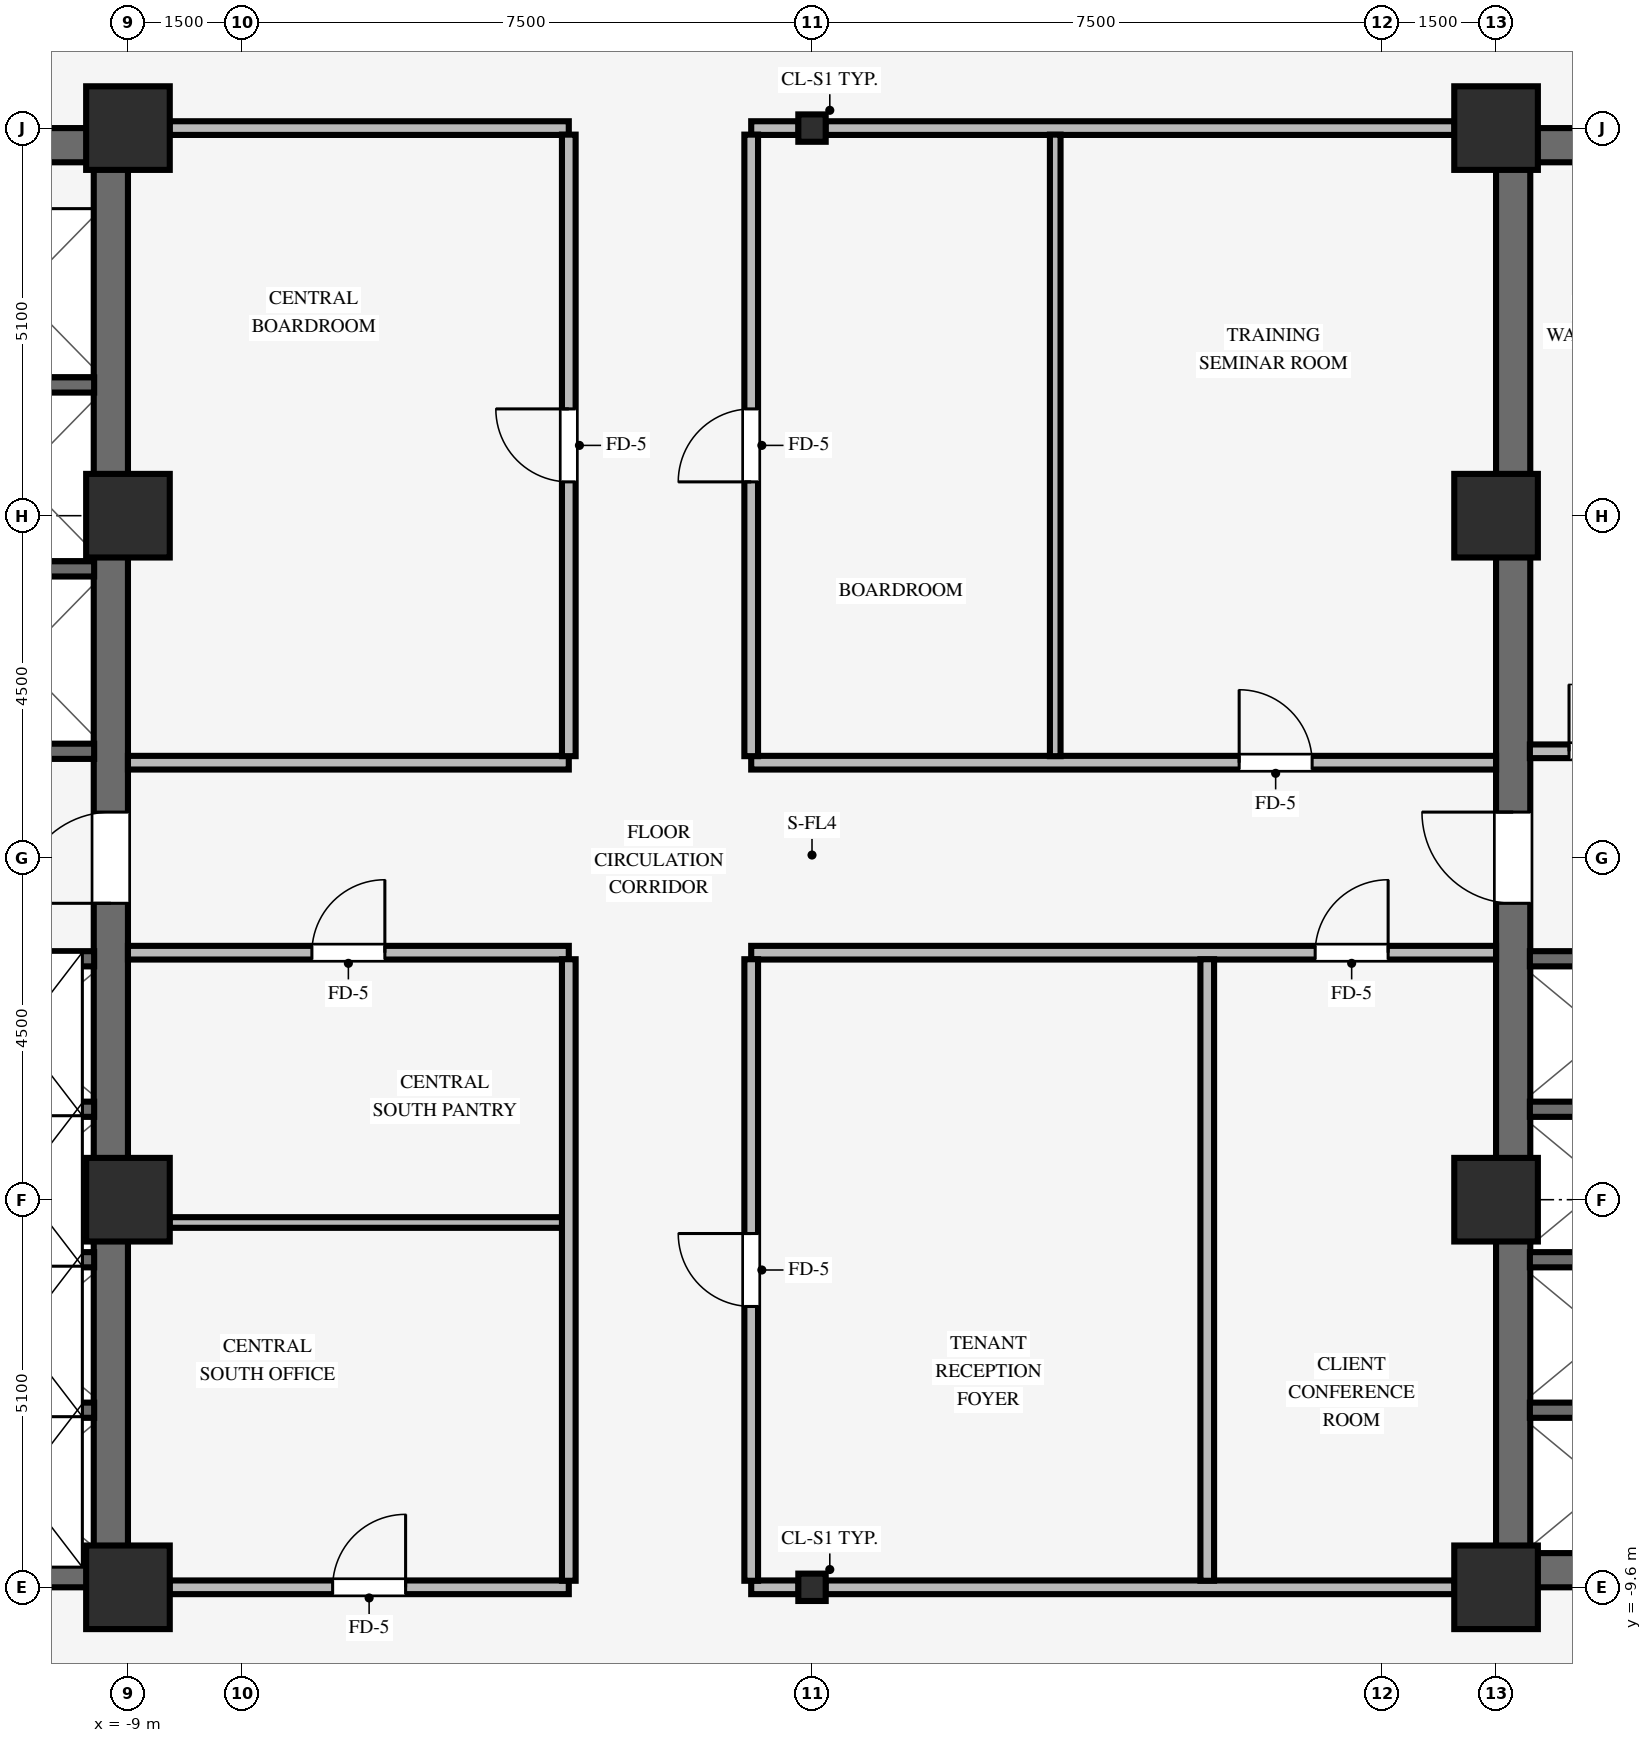
"""IFC4 building model, lengths in metres.
Left out: names, types, materials, properties, quantities, classifications, styles, units other than length and angle.
Written with IfcOpenShell. Run it as: python <this file> out.ifc"""

import sys

from ifc_helpers import new_model, si_unit, direction, frame, frame_2d, origin, origin_2d, place, context, subcontext, project, spatial, rectangle, i_section, extrude, source, transform, mapped, element, fill, save


model = new_model("IFC4")
c1 = context("Model", 3, precision=1e-05, world=origin(), true_north=direction((0.0, 1.0)))
c2 = subcontext(c1, "Body", "Model", "MODEL_VIEW")
j1 = project(units=[si_unit("LENGTHUNIT", "METRE"), si_unit("PLANEANGLEUNIT", "RADIAN")], contexts=[c1])
p1 = place(None, origin())
s1 = spatial("IfcSite", under=j1, at=p1, CompositionType="ELEMENT")
p2 = place(p1, origin())
s2 = spatial("IfcBuilding", under=s1, at=p2, CompositionType="ELEMENT")
p3 = place(p2, frame((0.0, 0.0, 78.7)))
s3 = spatial("IfcBuildingStorey", under=s2, at=p3, CompositionType="ELEMENT", Elevation=78.7)
for number, where, z_axis, x_axis in (
    (1, (-17.5, -9.375, 0.0), (0.0, 0.0, 1.0), (1.0, 0.0, 0.0)),
    (2, (-17.5, 9.375, 0.0), (0.0, 0.0, 1.0), (1.0, 0.0, 0.0)),
):
    element("IfcWall", number, at=place(p3, frame(where, z_axis=z_axis, x_axis=x_axis)), inside=s3, PredefinedType="SHEAR", context=c2, shape_type="SweptSolid", body=[
        extrude(rectangle(XDim=8.5, YDim=0.45, at=frame_2d((4.25, 0.0))), origin(), (0.0, 0.0, 1.0), 3.37),
    ])
p4 = place(p3, frame((-9.225, -9.155, 0.0), z_axis=(0.0, 0.0, 1.0), x_axis=(0.0, 1.0, 0.0)))
e3 = element("IfcWall", 3, at=p4, inside=s3, PredefinedType="SHEAR", context=c2, shape_type="SweptSolid", body=[
    extrude(rectangle(XDim=18.31, YDim=0.45, at=frame_2d((9.155, 0.0))), origin(), (0.0, 0.0, 1.0), 3.37),
])
p5 = place(p4, frame((8.555, 0.0, 0.0)))
e4 = element("IfcOpeningElement", 4, at=p5, cuts=e3, PredefinedType="OPENING", context=c2, shape_type="SweptSolid", body=[
    extrude(rectangle(XDim=1.2, YDim=2.15, at=frame_2d((0.6, 1.075))), frame((0.0, 0.235, 0.0), z_axis=(0.0, -1.0, 0.0), x_axis=(1.0, 0.0, 0.0)), (0.0, 0.0, 1.0), 0.47),
])
for number, where, z_axis, x_axis in (
    (5, (9.0, -9.375, 0.0), (0.0, 0.0, 1.0), (1.0, 0.0, 0.0)),
    (6, (9.0, 9.375, 0.0), (0.0, 0.0, 1.0), (1.0, 0.0, 0.0)),
):
    element("IfcWall", number, at=place(p3, frame(where, z_axis=z_axis, x_axis=x_axis)), inside=s3, PredefinedType="SHEAR", context=c2, shape_type="SweptSolid", body=[
        extrude(rectangle(XDim=8.5, YDim=0.45, at=frame_2d((4.25, 0.0))), origin(), (0.0, 0.0, 1.0), 3.37),
    ])
p6 = place(p3, frame((9.225, -9.155, 0.0), z_axis=(0.0, 0.0, 1.0), x_axis=(0.0, 1.0, 0.0)))
e7 = element("IfcWall", 7, at=p6, inside=s3, PredefinedType="SHEAR", context=c2, shape_type="SweptSolid", body=[
    extrude(rectangle(XDim=18.31, YDim=0.45, at=frame_2d((9.155, 0.0))), origin(), (0.0, 0.0, 1.0), 3.37),
])
p7 = place(p6, frame((8.555, 0.0, 0.0)))
e8 = element("IfcOpeningElement", 8, at=p7, cuts=e7, PredefinedType="OPENING", context=c2, shape_type="SweptSolid", body=[
    extrude(rectangle(XDim=1.2, YDim=2.15, at=frame_2d((0.6, 1.075))), frame((0.0, 0.235, 0.0), z_axis=(0.0, -1.0, 0.0), x_axis=(1.0, 0.0, 0.0)), (0.0, 0.0, 1.0), 0.47),
])
for number, where, z_axis, x_axis in (
    (9, (-9.0, -9.6, 0.0), (0.0, 0.0, 1.0), (1.0, 0.0, 0.0)),
    (10, (-9.0, -4.5, 0.0), (0.0, 0.0, 1.0), (1.0, 0.0, 0.0)),
    (11, (-9.0, 4.5, 0.0), (0.0, 0.0, 1.0), (1.0, 0.0, 0.0)),
    (12, (-9.0, 9.6, 0.0), (0.0, 0.0, 1.0), (1.0, 0.0, 0.0)),
    (13, (9.0, -9.6, 0.0), (0.0, 0.0, 1.0), (1.0, 0.0, 0.0)),
    (14, (9.0, -4.5, 0.0), (0.0, 0.0, 1.0), (1.0, 0.0, 0.0)),
    (15, (9.0, 4.5, 0.0), (0.0, 0.0, 1.0), (1.0, 0.0, 0.0)),
    (16, (9.0, 9.6, 0.0), (0.0, 0.0, 1.0), (1.0, 0.0, 0.0)),
):
    element("IfcColumn", number, at=place(p3, frame(where, z_axis=z_axis, x_axis=x_axis)), inside=s3, PredefinedType="COLUMN", context=c2, shape_type="SweptSolid", body=[
        extrude(rectangle(XDim=1.1, YDim=1.1, at=origin_2d()), origin(), (0.0, 0.0, 1.0), 3.37),
    ])
for number, where, z_axis, x_axis in (
    (17, (0.0, -9.6, 0.0), (0.0, 0.0, 1.0), (1.0, 0.0, 0.0)),
    (18, (0.0, 9.6, 0.0), (0.0, 0.0, 1.0), (1.0, 0.0, 0.0)),
):
    element("IfcColumn", number, at=place(p3, frame(where, z_axis=z_axis, x_axis=x_axis)), inside=s3, PredefinedType="COLUMN", context=c2, shape_type="SweptSolid", body=[
        extrude(i_section(OverallWidth=0.36, OverallDepth=0.36, WebThickness=0.021, FlangeThickness=0.021, FilletRadius=0.018, at=origin_2d()), origin(), (0.0, 0.0, 1.0), 3.37),
    ])
for number, where, z_axis, x_axis in (
    (19, (-11.505, -7.27, 0.0), (0.0, 0.0, 1.0), (1.0, 0.0, 0.0)),
    (20, (-11.505, -5.29, 0.0), (0.0, 0.0, 1.0), (1.0, 0.0, 0.0)),
    (21, (-11.505, -3.31, 0.0), (0.0, 0.0, 1.0), (1.0, 0.0, 0.0)),
    (22, (-11.505, -1.33, 0.0), (0.0, 0.0, 1.0), (1.0, 0.0, 0.0)),
    (23, (-11.505, 1.4, 0.0), (0.0, 0.0, 1.0), (1.0, 0.0, 0.0)),
    (24, (-11.505, 3.8, 0.0), (0.0, 0.0, 1.0), (1.0, 0.0, 0.0)),
    (25, (-11.505, 6.22, 0.0), (0.0, 0.0, 1.0), (1.0, 0.0, 0.0)),
    (26, (9.445, -7.27, 0.0), (0.0, 0.0, 1.0), (1.0, 0.0, 0.0)),
    (27, (9.445, -5.29, 0.0), (0.0, 0.0, 1.0), (1.0, 0.0, 0.0)),
    (28, (9.445, -3.31, 0.0), (0.0, 0.0, 1.0), (1.0, 0.0, 0.0)),
    (29, (9.445, -1.33, 0.0), (0.0, 0.0, 1.0), (1.0, 0.0, 0.0)),
):
    element("IfcWall", number, at=place(p3, frame(where, z_axis=z_axis, x_axis=x_axis)), inside=s3, PredefinedType="SHEAR", context=c2, shape_type="SweptSolid", body=[
        extrude(rectangle(XDim=2.06, YDim=0.2, at=frame_2d((1.03, 0.0))), origin(), (0.0, 0.0, 1.0), 3.37),
    ])
p8 = place(p3, frame((9.445, 1.4, 0.0), z_axis=(0.0, 0.0, 1.0), x_axis=(1.0, 0.0, 0.0)))
e30 = element("IfcWall", 30, at=p8, inside=s3, PredefinedType="PARTITIONING", context=c2, shape_type="SweptSolid", body=[
    extrude(rectangle(XDim=3.9, YDim=0.18, at=frame_2d((1.95, 0.0))), origin(), (0.0, 0.0, 1.0), 3.36),
])
p9 = place(p8, frame((0.515, 0.0, 0.0)))
e31 = element("IfcOpeningElement", 31, at=p9, cuts=e30, PredefinedType="OPENING", context=c2, shape_type="SweptSolid", body=[
    extrude(rectangle(XDim=0.88, YDim=2.1, at=frame_2d((0.44, 1.05))), frame((0.0, 0.1, 0.0), z_axis=(0.0, -1.0, 0.0), x_axis=(1.0, 0.0, 0.0)), (0.0, 0.0, 1.0), 0.2),
])
p10 = place(p8, frame((2.565, 0.0, 0.0)))
e32 = element("IfcOpeningElement", 32, at=p10, cuts=e30, PredefinedType="OPENING", context=c2, shape_type="SweptSolid", body=[
    extrude(rectangle(XDim=0.88, YDim=2.1, at=frame_2d((0.44, 1.05))), frame((0.0, 0.1, 0.0), z_axis=(0.0, -1.0, 0.0), x_axis=(1.0, 0.0, 0.0)), (0.0, 0.0, 1.0), 0.2),
])
p11 = place(p3, frame((-8.454, -9.6, 0.0), z_axis=(0.0, 0.0, 1.0), x_axis=(1.0, 0.0, 0.0)))
e33 = element("IfcWall", 33, at=p11, inside=s3, PredefinedType="PARTITIONING", context=c2, shape_type="SweptSolid", body=[
    extrude(rectangle(XDim=5.254, YDim=0.18, at=frame_2d((2.627, 0.0))), origin(), (0.0, 0.0, 1.0), 2.405),
])
p12 = place(p11, frame((2.147, 0.0, 0.0)))
e34 = element("IfcOpeningElement", 34, at=p12, cuts=e33, PredefinedType="OPENING", context=c2, shape_type="SweptSolid", body=[
    extrude(rectangle(XDim=0.96, YDim=2.1, at=frame_2d((0.48, 1.05))), frame((0.0, 0.1, 0.0), z_axis=(0.0, -1.0, 0.0), x_axis=(1.0, 0.0, 0.0)), (0.0, 0.0, 1.0), 0.2),
])
p13 = place(p3, frame((-0.8, -9.6, 0.0), z_axis=(0.0, 0.0, 1.0), x_axis=(1.0, 0.0, 0.0)))
e35 = element("IfcWall", 35, at=p13, inside=s3, PredefinedType="PARTITIONING", context=c2, shape_type="SweptSolid", body=[
    extrude(rectangle(XDim=0.624, YDim=0.18, at=frame_2d((0.312, 0.0))), origin(), (0.0, 0.0, 1.0), 2.405),
])
p14 = place(p3, frame((0.176, -9.6, 0.0), z_axis=(0.0, 0.0, 1.0), x_axis=(1.0, 0.0, 0.0)))
e36 = element("IfcWall", 36, at=p14, inside=s3, PredefinedType="PARTITIONING", context=c2, shape_type="SweptSolid", body=[
    extrude(rectangle(XDim=8.278, YDim=0.18, at=frame_2d((4.139, 0.0))), origin(), (0.0, 0.0, 1.0), 2.405),
])
p15 = place(p3, frame((-8.454, -4.8, 0.0), z_axis=(0.0, 0.0, 1.0), x_axis=(1.0, 0.0, 0.0)))
e37 = element("IfcWall", 37, at=p15, inside=s3, PredefinedType="PARTITIONING", context=c2, shape_type="SweptSolid", body=[
    extrude(rectangle(XDim=5.168, YDim=0.14, at=frame_2d((2.584, 0.0))), origin(), (0.0, 0.0, 1.0), 2.738),
])
p16 = place(p3, frame((-9.0, -1.25, 0.0), z_axis=(0.0, 0.0, 1.0), x_axis=(1.0, 0.0, 0.0)))
e38 = element("IfcWall", 38, at=p16, inside=s3, PredefinedType="PARTITIONING", context=c2, shape_type="SweptSolid", body=[
    extrude(rectangle(XDim=5.8, YDim=0.18, at=frame_2d((2.9, 0.0))), origin(), (0.0, 0.0, 1.0), 3.36),
])
p17 = place(p16, frame((2.42, 0.0, 0.0)))
e39 = element("IfcOpeningElement", 39, at=p17, cuts=e38, PredefinedType="OPENING", context=c2, shape_type="SweptSolid", body=[
    extrude(rectangle(XDim=0.96, YDim=2.1, at=frame_2d((0.48, 1.05))), frame((0.0, 0.1, 0.0), z_axis=(0.0, -1.0, 0.0), x_axis=(1.0, 0.0, 0.0)), (0.0, 0.0, 1.0), 0.2),
])
p18 = place(p3, frame((-0.8, -1.25, 0.0), z_axis=(0.0, 0.0, 1.0), x_axis=(1.0, 0.0, 0.0)))
e40 = element("IfcWall", 40, at=p18, inside=s3, PredefinedType="PARTITIONING", context=c2, shape_type="SweptSolid", body=[
    extrude(rectangle(XDim=9.8, YDim=0.18, at=frame_2d((4.9, 0.0))), origin(), (0.0, 0.0, 1.0), 3.36),
])
p19 = place(p18, frame((7.42, 0.0, 0.0)))
e41 = element("IfcOpeningElement", 41, at=p19, cuts=e40, PredefinedType="OPENING", context=c2, shape_type="SweptSolid", body=[
    extrude(rectangle(XDim=0.96, YDim=2.1, at=frame_2d((0.48, 1.05))), frame((0.0, 0.1, 0.0), z_axis=(0.0, -1.0, 0.0), x_axis=(1.0, 0.0, 0.0)), (0.0, 0.0, 1.0), 0.2),
])
p20 = place(p3, frame((-9.0, 1.25, 0.0), z_axis=(0.0, 0.0, 1.0), x_axis=(1.0, 0.0, 0.0)))
e42 = element("IfcWall", 42, at=p20, inside=s3, PredefinedType="PARTITIONING", context=c2, shape_type="SweptSolid", body=[
    extrude(rectangle(XDim=5.8, YDim=0.18, at=frame_2d((2.9, 0.0))), origin(), (0.0, 0.0, 1.0), 3.36),
])
p21 = place(p3, frame((-0.8, 1.25, 0.0), z_axis=(0.0, 0.0, 1.0), x_axis=(1.0, 0.0, 0.0)))
e43 = element("IfcWall", 43, at=p21, inside=s3, PredefinedType="PARTITIONING", context=c2, shape_type="SweptSolid", body=[
    extrude(rectangle(XDim=9.8, YDim=0.18, at=frame_2d((4.9, 0.0))), origin(), (0.0, 0.0, 1.0), 3.36),
])
p22 = place(p21, frame((6.42, 0.0, 0.0)))
e44 = element("IfcOpeningElement", 44, at=p22, cuts=e43, PredefinedType="OPENING", context=c2, shape_type="SweptSolid", body=[
    extrude(rectangle(XDim=0.96, YDim=2.1, at=frame_2d((0.48, 1.05))), frame((0.0, 0.1, 0.0), z_axis=(0.0, -1.0, 0.0), x_axis=(1.0, 0.0, 0.0)), (0.0, 0.0, 1.0), 0.2),
])
p23 = place(p3, frame((-8.454, 9.6, 0.0), z_axis=(0.0, 0.0, 1.0), x_axis=(1.0, 0.0, 0.0)))
e45 = element("IfcWall", 45, at=p23, inside=s3, PredefinedType="PARTITIONING", context=c2, shape_type="SweptSolid", body=[
    extrude(rectangle(XDim=5.254, YDim=0.18, at=frame_2d((2.627, 0.0))), origin(), (0.0, 0.0, 1.0), 2.405),
])
p24 = place(p3, frame((-0.8, 9.6, 0.0), z_axis=(0.0, 0.0, 1.0), x_axis=(1.0, 0.0, 0.0)))
e46 = element("IfcWall", 46, at=p24, inside=s3, PredefinedType="PARTITIONING", context=c2, shape_type="SweptSolid", body=[
    extrude(rectangle(XDim=0.624, YDim=0.18, at=frame_2d((0.312, 0.0))), origin(), (0.0, 0.0, 1.0), 2.405),
])
p25 = place(p3, frame((0.176, 9.6, 0.0), z_axis=(0.0, 0.0, 1.0), x_axis=(1.0, 0.0, 0.0)))
e47 = element("IfcWall", 47, at=p25, inside=s3, PredefinedType="PARTITIONING", context=c2, shape_type="SweptSolid", body=[
    extrude(rectangle(XDim=8.278, YDim=0.18, at=frame_2d((4.139, 0.0))), origin(), (0.0, 0.0, 1.0), 2.405),
])
p26 = place(p3, frame((-3.2, -9.514, 0.0), z_axis=(0.0, 0.0, 1.0), x_axis=(0.0, 1.0, 0.0)))
e48 = element("IfcWall", 48, at=p26, inside=s3, PredefinedType="PARTITIONING", context=c2, shape_type="SweptSolid", body=[
    extrude(rectangle(XDim=8.178, YDim=0.18, at=frame_2d((4.089, 0.0))), origin(), (0.0, 0.0, 1.0), 3.36),
])
p27 = place(p3, frame((-3.2, 1.336, 0.0), z_axis=(0.0, 0.0, 1.0), x_axis=(0.0, 1.0, 0.0)))
e49 = element("IfcWall", 49, at=p27, inside=s3, PredefinedType="PARTITIONING", context=c2, shape_type="SweptSolid", body=[
    extrude(rectangle(XDim=8.178, YDim=0.18, at=frame_2d((4.089, 0.0))), origin(), (0.0, 0.0, 1.0), 3.36),
])
p28 = place(p27, frame((3.609, 0.0, 0.0)))
e50 = element("IfcOpeningElement", 50, at=p28, cuts=e49, PredefinedType="OPENING", context=c2, shape_type="SweptSolid", body=[
    extrude(rectangle(XDim=0.96, YDim=2.1, at=frame_2d((0.48, 1.05))), frame((0.0, 0.1, 0.0), z_axis=(0.0, -1.0, 0.0), x_axis=(1.0, 0.0, 0.0)), (0.0, 0.0, 1.0), 0.2),
])
p29 = place(p3, frame((-0.8, -9.514, 0.0), z_axis=(0.0, 0.0, 1.0), x_axis=(0.0, 1.0, 0.0)))
e51 = element("IfcWall", 51, at=p29, inside=s3, PredefinedType="PARTITIONING", context=c2, shape_type="SweptSolid", body=[
    extrude(rectangle(XDim=8.178, YDim=0.18, at=frame_2d((4.089, 0.0))), origin(), (0.0, 0.0, 1.0), 3.36),
])
p30 = place(p29, frame((3.609, 0.0, 0.0)))
e52 = element("IfcOpeningElement", 52, at=p30, cuts=e51, PredefinedType="OPENING", context=c2, shape_type="SweptSolid", body=[
    extrude(rectangle(XDim=0.96, YDim=2.1, at=frame_2d((0.48, 1.05))), frame((0.0, 0.1, 0.0), z_axis=(0.0, -1.0, 0.0), x_axis=(1.0, 0.0, 0.0)), (0.0, 0.0, 1.0), 0.2),
])
p31 = place(p3, frame((-0.8, 1.336, 0.0), z_axis=(0.0, 0.0, 1.0), x_axis=(0.0, 1.0, 0.0)))
e53 = element("IfcWall", 53, at=p31, inside=s3, PredefinedType="PARTITIONING", context=c2, shape_type="SweptSolid", body=[
    extrude(rectangle(XDim=8.178, YDim=0.18, at=frame_2d((4.089, 0.0))), origin(), (0.0, 0.0, 1.0), 3.36),
])
p32 = place(p31, frame((3.609, 0.0, 0.0)))
e54 = element("IfcOpeningElement", 54, at=p32, cuts=e53, PredefinedType="OPENING", context=c2, shape_type="SweptSolid", body=[
    extrude(rectangle(XDim=0.96, YDim=2.1, at=frame_2d((0.48, 1.05))), frame((0.0, 0.1, 0.0), z_axis=(0.0, -1.0, 0.0), x_axis=(1.0, 0.0, 0.0)), (0.0, 0.0, 1.0), 0.2),
])
p33 = place(p3, frame((3.2, 1.336, 0.0), z_axis=(0.0, 0.0, 1.0), x_axis=(0.0, 1.0, 0.0)))
e55 = element("IfcWall", 55, at=p33, inside=s3, PredefinedType="PARTITIONING", context=c2, shape_type="SweptSolid", body=[
    extrude(rectangle(XDim=8.178, YDim=0.14, at=frame_2d((4.089, 0.0))), origin(), (0.0, 0.0, 1.0), 3.36),
])
p34 = place(p3, frame((5.2, -9.514, 0.0), z_axis=(0.0, 0.0, 1.0), x_axis=(0.0, 1.0, 0.0)))
e56 = element("IfcWall", 56, at=p34, inside=s3, PredefinedType="PARTITIONING", context=c2, shape_type="SweptSolid", body=[
    extrude(rectangle(XDim=8.178, YDim=0.18, at=frame_2d((4.089, 0.0))), origin(), (0.0, 0.0, 1.0), 3.36),
])
m1 = source(origin(), c2, "Body", "SweptSolid", [
    extrude(rectangle(XDim=1.2, YDim=2.15, at=frame_2d((0.6, 1.075))), frame((0.0, 0.025, 0.0), z_axis=(0.0, -1.0, 0.0), x_axis=(1.0, 0.0, 0.0)), (0.0, 0.0, 1.0), 0.05),
])
p35 = place(p5, origin())
e57 = element("IfcDoor", 57, at=p35, inside=s3, OperationType="SINGLE_SWING_LEFT", PredefinedType="DOOR", context=c2, shape_type="MappedRepresentation", body=[
    mapped(m1, transform((0.0, 0.0, 0.0), scale=1.0)),
])
fill(e4, e57)
p36 = place(p7, origin())
e58 = element("IfcDoor", 58, at=p36, inside=s3, OperationType="SINGLE_SWING_RIGHT", PredefinedType="DOOR", context=c2, shape_type="MappedRepresentation", body=[
    mapped(m1, transform((0.0, 0.0, 0.0), scale=1.0)),
])
fill(e8, e58)
m2 = source(origin(), c2, "Body", "SweptSolid", [
    extrude(rectangle(XDim=0.88, YDim=2.1, at=frame_2d((0.44, 1.05))), frame((0.0, 0.025, 0.0), z_axis=(0.0, -1.0, 0.0), x_axis=(1.0, 0.0, 0.0)), (0.0, 0.0, 1.0), 0.05),
])
p37 = place(p9, origin())
e59 = element("IfcDoor", 59, at=p37, inside=s3, OperationType="SINGLE_SWING_LEFT", PredefinedType="DOOR", context=c2, shape_type="MappedRepresentation", body=[
    mapped(m2, transform((0.0, 0.0, 0.0), scale=1.0)),
])
fill(e31, e59)
m3 = source(origin(), c2, "Body", "SweptSolid", [
    extrude(rectangle(XDim=0.96, YDim=2.1, at=frame_2d((0.48, 1.05))), frame((0.0, 0.025, 0.0), z_axis=(0.0, -1.0, 0.0), x_axis=(1.0, 0.0, 0.0)), (0.0, 0.0, 1.0), 0.05),
])
p38 = place(p28, origin())
e60 = element("IfcDoor", 60, at=p38, inside=s3, OperationType="SINGLE_SWING_RIGHT", PredefinedType="DOOR", context=c2, shape_type="MappedRepresentation", body=[
    mapped(m3, transform((0.0, 0.0, 0.0), scale=1.0)),
])
fill(e50, e60)
p39 = place(p32, origin())
e61 = element("IfcDoor", 61, at=p39, inside=s3, OperationType="SINGLE_SWING_LEFT", PredefinedType="DOOR", context=c2, shape_type="MappedRepresentation", body=[
    mapped(m3, transform((0.0, 0.0, 0.0), scale=1.0)),
])
fill(e54, e61)
p40 = place(p30, origin())
e62 = element("IfcDoor", 62, at=p40, inside=s3, OperationType="SINGLE_SWING_RIGHT", PredefinedType="DOOR", context=c2, shape_type="MappedRepresentation", body=[
    mapped(m3, transform((0.0, 0.0, 0.0), scale=1.0)),
])
fill(e52, e62)
p41 = place(p17, origin())
e63 = element("IfcDoor", 63, at=p41, inside=s3, OperationType="SINGLE_SWING_RIGHT", PredefinedType="DOOR", context=c2, shape_type="MappedRepresentation", body=[
    mapped(m3, transform((0.0, 0.0, 0.0), scale=1.0)),
])
fill(e39, e63)
p42 = place(p22, origin())
e64 = element("IfcDoor", 64, at=p42, inside=s3, OperationType="SINGLE_SWING_LEFT", PredefinedType="DOOR", context=c2, shape_type="MappedRepresentation", body=[
    mapped(m3, transform((0.0, 0.0, 0.0), scale=1.0)),
])
fill(e44, e64)
p43 = place(p12, origin())
e65 = element("IfcDoor", 65, at=p43, inside=s3, OperationType="SINGLE_SWING_RIGHT", PredefinedType="DOOR", context=c2, shape_type="MappedRepresentation", body=[
    mapped(m3, transform((0.0, 0.0, 0.0), scale=1.0)),
])
fill(e34, e65)
p44 = place(p19, origin())
e66 = element("IfcDoor", 66, at=p44, inside=s3, OperationType="SINGLE_SWING_RIGHT", PredefinedType="DOOR", context=c2, shape_type="MappedRepresentation", body=[
    mapped(m3, transform((0.0, 0.0, 0.0), scale=1.0)),
])
fill(e41, e66)
save(model, sys.argv[1])
